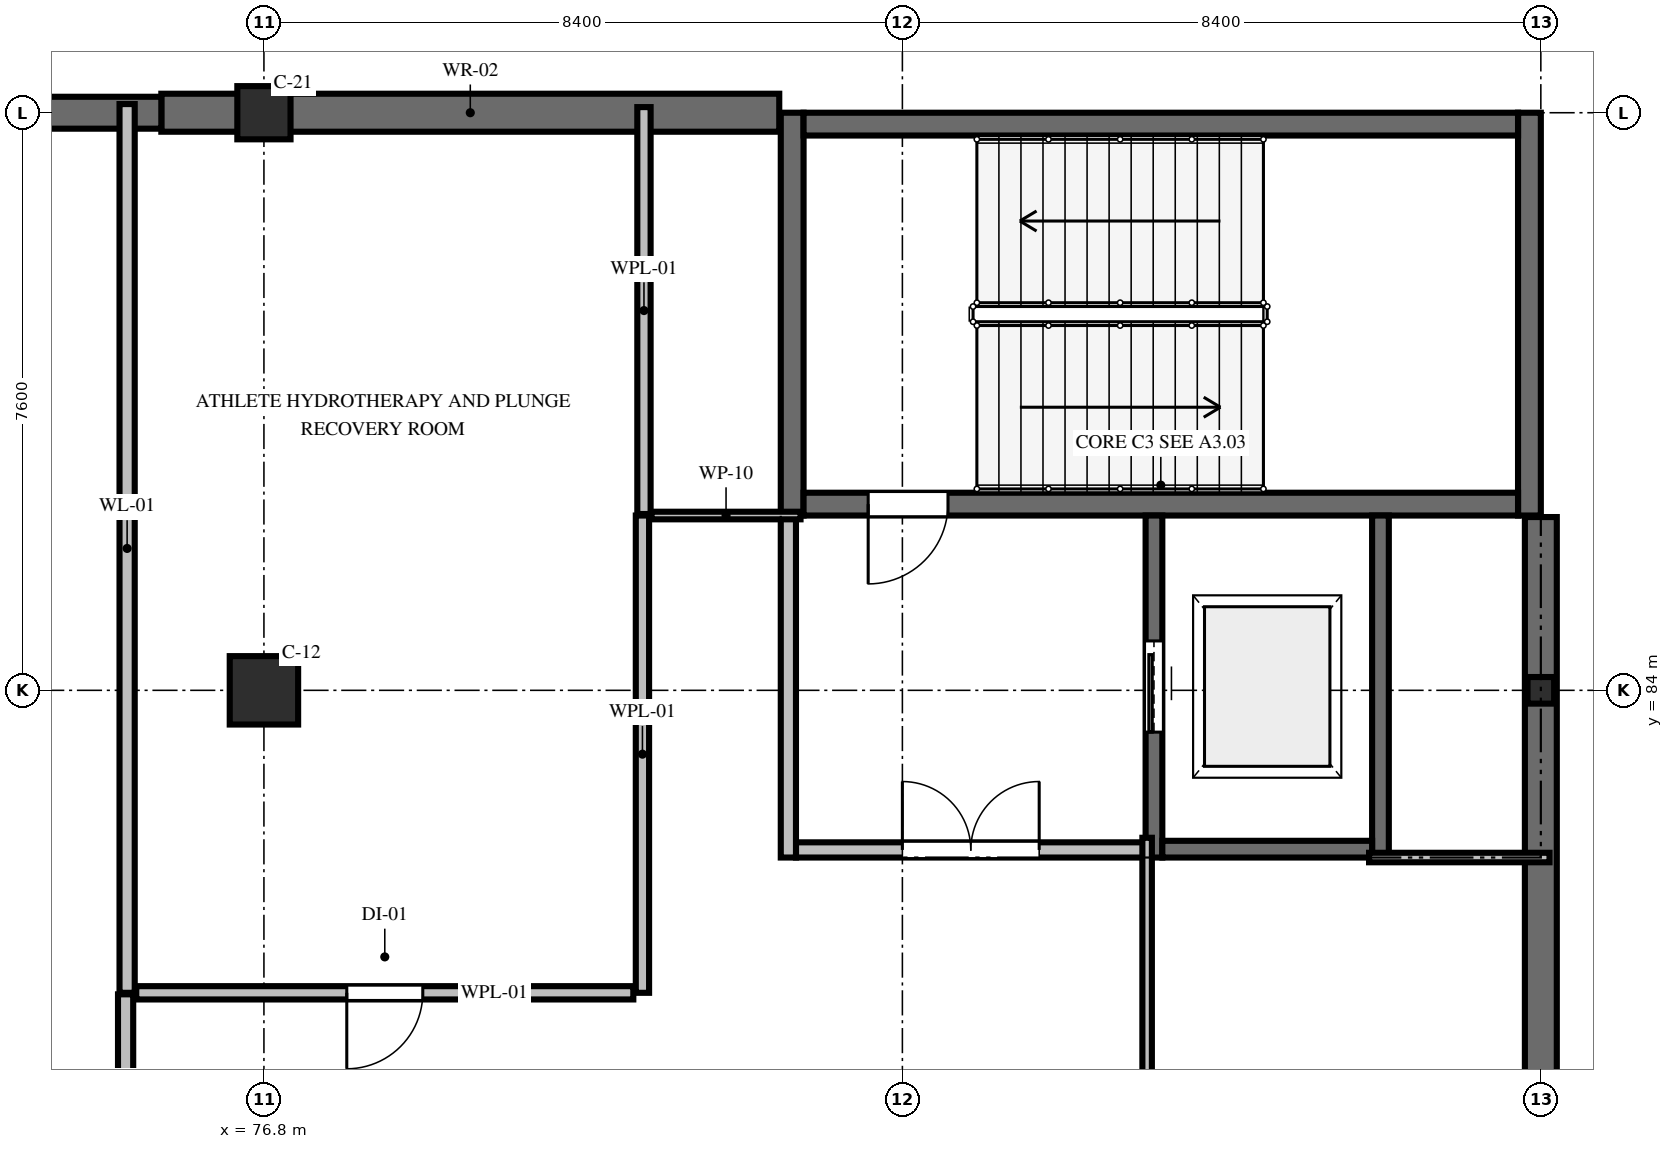
"""IFC4 building model, lengths in metres.
Left out: names, types, materials, properties, quantities, classifications, styles, units other than length and angle.
Written with IfcOpenShell. Run it as: python <this file> out.ifc"""

import sys

from ifc_helpers import new_model, si_unit, direction, frame, frame_2d, origin, origin_2d, place, context, subcontext, project, spatial, rectangle, hollow_rectangle, circle, i_section, extrude, element, fill, save


model = new_model("IFC4")
c1 = context("Model", 3, precision=1e-05, world=origin(), true_north=direction((0.0, 1.0)))
c2 = subcontext(c1, "Body", "Model", "MODEL_VIEW")
j1 = project(units=[si_unit("LENGTHUNIT", "METRE"), si_unit("PLANEANGLEUNIT", "RADIAN")], contexts=[c1])
p1 = place(None, origin())
s1 = spatial("IfcSite", under=j1, at=p1, CompositionType="ELEMENT")
p2 = place(p1, origin())
s2 = spatial("IfcBuilding", under=s1, at=p2, CompositionType="ELEMENT")
p3 = place(p2, frame((0.0, 0.0, -4.8)))
s3 = spatial("IfcBuildingStorey", under=s2, at=p3, CompositionType="ELEMENT", Elevation=-4.8)
p4 = place(p3, frame((76.8, 84.0, 0.0), z_axis=(0.0, 0.0, 1.0), x_axis=(1.0, 0.0, 0.0)))
e1 = element("IfcColumn", 1, at=p4, inside=s3, PredefinedType="COLUMN", context=c2, shape_type="SweptSolid", body=[
    extrude(circle(Radius=0.45, at=origin_2d()), origin(), (0.0, 0.0, 1.0), 4.8),
])
p5 = place(p3, frame((76.8, 91.6, 0.0), z_axis=(0.0, 0.0, 1.0), x_axis=(1.0, 0.0, 0.0)))
e2 = element("IfcColumn", 2, at=p5, inside=s3, PredefinedType="COLUMN", context=c2, shape_type="SweptSolid", body=[
    extrude(hollow_rectangle(XDim=0.7, YDim=0.7, WallThickness=0.028, InnerFilletRadius=0.028, OuterFilletRadius=0.056, at=origin_2d()), origin(), (0.0, 0.0, 1.0), 4.8),
])
p6 = place(p3, frame((93.6, 84.0, 0.0), z_axis=(0.0, 0.0, 1.0), x_axis=(1.0, 0.0, 0.0)))
e3 = element("IfcColumn", 3, at=p6, inside=s3, PredefinedType="COLUMN", context=c2, shape_type="SweptSolid", body=[
    extrude(i_section(OverallWidth=0.35, OverallDepth=0.35, WebThickness=0.012, FlangeThickness=0.019, FilletRadius=0.013, at=origin_2d()), origin(), (0.0, 0.0, 1.0), 4.8),
])
p7 = place(p3, frame((93.6, 77.971, 0.0), z_axis=(0.0, 0.0, 1.0), x_axis=(0.0, 1.0, 0.0)))
e4 = element("IfcWall", 4, at=p7, inside=s3, PredefinedType="USERDEFINED", context=c2, shape_type="SweptSolid", body=[
    extrude(rectangle(XDim=8.309, YDim=0.42, at=frame_2d((4.154, 0.0))), origin(), (0.0, 0.0, 1.0), 4.32),
])
p8 = place(p3, frame((83.58, 91.6, 0.0), z_axis=(0.0, 0.0, 1.0), x_axis=(-1.0, 0.0, 0.0)))
e5 = element("IfcWall", 5, at=p8, inside=s3, PredefinedType="USERDEFINED", context=c2, shape_type="SweptSolid", body=[
    extrude(rectangle(XDim=8.13, YDim=0.5, at=frame_2d((4.065, 0.0))), origin(), (0.0, 0.0, 1.0), 4.32),
])
p9 = place(p3, frame((75.45, 91.6, 0.0), z_axis=(0.0, 0.0, 1.0), x_axis=(-1.0, 0.0, 0.0)))
e6 = element("IfcWall", 6, at=p9, inside=s3, PredefinedType="USERDEFINED", context=c2, shape_type="SweptSolid", body=[
    extrude(rectangle(XDim=8.13, YDim=0.42, at=frame_2d((4.065, 0.0))), origin(), (0.0, 0.0, 1.0), 4.32),
])
for number, where, z_axis, x_axis in (
    (7, (83.75, 86.3, 0.0), (0.0, 0.0, 1.0), (0.0, 1.0, 0.0)),
    (8, (93.45, 91.6, 0.0), (0.0, 0.0, 1.0), (0.0, -1.0, 0.0)),
):
    element("IfcWall", number, at=place(p3, frame(where, z_axis=z_axis, x_axis=x_axis)), inside=s3, PredefinedType="SHEAR", context=c2, shape_type="SweptSolid", body=[
        extrude(rectangle(XDim=5.3, YDim=0.3, at=frame_2d((2.65, 0.0))), origin(), (0.0, 0.0, 1.0), 4.51),
    ])
p10 = place(p3, frame((93.3, 86.45, 0.0), z_axis=(0.0, 0.0, 1.0), x_axis=(-1.0, 0.0, 0.0)))
e9 = element("IfcWall", 9, at=p10, inside=s3, PredefinedType="SHEAR", context=c2, shape_type="SweptSolid", body=[
    extrude(rectangle(XDim=9.4, YDim=0.3, at=frame_2d((4.7, 0.0))), origin(), (0.0, 0.0, 1.0), 4.51),
])
p11 = place(p10, frame((7.5, 0.0, 0.0)))
e10 = element("IfcOpeningElement", 10, at=p11, cuts=e9, PredefinedType="OPENING", context=c2, shape_type="SweptSolid", body=[
    extrude(rectangle(XDim=1.05, YDim=2.2, at=frame_2d((0.525, 1.1))), frame((0.0, 0.16, 0.0), z_axis=(0.0, -1.0, 0.0), x_axis=(1.0, 0.0, 0.0)), (0.0, 0.0, 1.0), 0.32),
])
p12 = place(p3, frame((83.9, 91.45, 0.0), z_axis=(0.0, 0.0, 1.0), x_axis=(1.0, 0.0, 0.0)))
e11 = element("IfcWall", 11, at=p12, inside=s3, PredefinedType="SHEAR", context=c2, shape_type="SweptSolid", body=[
    extrude(rectangle(XDim=9.4, YDim=0.3, at=frame_2d((4.7, 0.0))), origin(), (0.0, 0.0, 1.0), 4.51),
])
p13 = place(p3, frame((83.8, 81.9, 0.0), z_axis=(0.0, 0.0, 1.0), x_axis=(1.0, 0.0, 0.0)))
e12 = element("IfcWall", 12, at=p13, inside=s3, PredefinedType="SOLIDWALL", context=c2, shape_type="SweptSolid", body=[
    extrude(rectangle(XDim=4.6, YDim=0.2, at=frame_2d((2.3, 0.0))), origin(), (0.0, 0.0, 1.0), 3.578),
])
p14 = place(p13, frame((1.4, 0.0, 0.0)))
e13 = element("IfcOpeningElement", 13, at=p14, cuts=e12, PredefinedType="OPENING", context=c2, shape_type="SweptSolid", body=[
    extrude(rectangle(XDim=1.8, YDim=2.2, at=frame_2d((0.9, 1.1))), frame((0.0, 0.11, 0.0), z_axis=(0.0, -1.0, 0.0), x_axis=(1.0, 0.0, 0.0)), (0.0, 0.0, 1.0), 0.22),
])
p15 = place(p3, frame((83.7, 81.8, 0.0), z_axis=(0.0, 0.0, 1.0), x_axis=(0.0, 1.0, 0.0)))
e14 = element("IfcWall", 14, at=p15, inside=s3, PredefinedType="SOLIDWALL", context=c2, shape_type="SweptSolid", body=[
    extrude(rectangle(XDim=4.5, YDim=0.2, at=frame_2d((2.25, 0.0))), origin(), (0.0, 0.0, 1.0), 3.578),
])
p16 = place(p3, frame((88.51, 81.8, 0.0), z_axis=(0.0, 0.0, 1.0), x_axis=(0.0, 1.0, 0.0)))
e15 = element("IfcWall", 15, at=p16, inside=s3, PredefinedType="SOLIDWALL", context=c2, shape_type="SweptSolid", body=[
    extrude(rectangle(XDim=4.5, YDim=0.22, at=frame_2d((2.25, 0.0))), origin(), (0.0, 0.0, 1.0), 4.51),
])
p17 = place(p16, frame((1.65, 0.0, 0.0)))
e16 = element("IfcOpeningElement", 16, at=p17, cuts=e15, PredefinedType="OPENING", context=c2, shape_type="SweptSolid", body=[
    extrude(rectangle(XDim=1.2, YDim=2.2, at=frame_2d((0.6, 1.1))), frame((0.0, 0.12, 0.0), z_axis=(0.0, -1.0, 0.0), x_axis=(1.0, 0.0, 0.0)), (0.0, 0.0, 1.0), 0.24),
])
p18 = place(p3, frame((91.49, 81.8, 0.0), z_axis=(0.0, 0.0, 1.0), x_axis=(0.0, 1.0, 0.0)))
e17 = element("IfcWall", 17, at=p18, inside=s3, PredefinedType="SOLIDWALL", context=c2, shape_type="SweptSolid", body=[
    extrude(rectangle(XDim=4.5, YDim=0.22, at=frame_2d((2.25, 0.0))), origin(), (0.0, 0.0, 1.0), 4.51),
])
p19 = place(p3, frame((88.62, 81.91, 0.0), z_axis=(0.0, 0.0, 1.0), x_axis=(1.0, 0.0, 0.0)))
e18 = element("IfcWall", 18, at=p19, inside=s3, PredefinedType="SOLIDWALL", context=c2, shape_type="SweptSolid", body=[
    extrude(rectangle(XDim=2.76, YDim=0.22, at=frame_2d((1.38, 0.0))), origin(), (0.0, 0.0, 1.0), 4.51),
])
p20 = place(p3, frame((75.0, 91.714, 0.0), z_axis=(0.0, 0.0, 1.0), x_axis=(0.0, -1.0, 0.0)))
e19 = element("IfcWall", 19, at=p20, inside=s3, PredefinedType="SOLIDWALL", context=c2, shape_type="SweptSolid", body=[
    extrude(rectangle(XDim=11.694, YDim=0.2, at=frame_2d((5.847, 0.0))), origin(), (0.0, 0.0, 1.0), 3.32),
])
p21 = place(p3, frame((74.98, 80.0, 0.0), z_axis=(0.0, 0.0, 1.0), x_axis=(0.0, -1.0, 0.0)))
e20 = element("IfcWall", 20, at=p21, inside=s3, PredefinedType="SOLIDWALL", context=c2, shape_type="SweptSolid", body=[
    extrude(rectangle(XDim=3.38, YDim=0.2, at=frame_2d((1.69, 0.0))), origin(), (0.0, 0.0, 1.0), 4.07),
])
p22 = place(p3, frame((81.8, 91.674, 0.0), z_axis=(0.0, 0.0, 1.0), x_axis=(0.0, -1.0, 0.0)))
e21 = element("IfcWall", 21, at=p22, inside=s3, PredefinedType="PLUMBINGWALL", context=c2, shape_type="SweptSolid", body=[
    extrude(rectangle(XDim=5.354, YDim=0.175, at=frame_2d((2.677, 0.0))), origin(), (0.0, 0.0, 1.0), 4.45),
])
p23 = place(p3, frame((81.78, 86.3, 0.0), z_axis=(0.0, 0.0, 1.0), x_axis=(0.0, -1.0, 0.0)))
e22 = element("IfcWall", 22, at=p23, inside=s3, PredefinedType="PLUMBINGWALL", context=c2, shape_type="SweptSolid", body=[
    extrude(rectangle(XDim=6.28, YDim=0.175, at=frame_2d((3.14, 0.0))), origin(), (0.0, 0.0, 1.0), 4.45),
])
p24 = place(p3, frame((81.66, 80.02, 0.0), z_axis=(0.0, 0.0, 1.0), x_axis=(-1.0, 0.0, 0.0)))
e23 = element("IfcWall", 23, at=p24, inside=s3, PredefinedType="PLUMBINGWALL", context=c2, shape_type="SweptSolid", body=[
    extrude(rectangle(XDim=6.54, YDim=0.175, at=frame_2d((3.27, 0.0))), origin(), (0.0, 0.0, 1.0), 3.62),
])
p25 = place(p24, frame((2.77, 0.0, 0.0)))
e24 = element("IfcOpeningElement", 24, at=p25, cuts=e23, PredefinedType="OPENING", context=c2, shape_type="SweptSolid", body=[
    extrude(rectangle(XDim=1.0, YDim=2.15, at=frame_2d((0.5, 1.075))), frame((0.0, 0.097, 0.0), z_axis=(0.0, -1.0, 0.0), x_axis=(1.0, 0.0, 0.0)), (0.0, 0.0, 1.0), 0.195),
])
p26 = place(p3, frame((88.42, 56.42, 0.0), z_axis=(0.0, 0.0, 1.0), x_axis=(0.0, 1.0, 0.0)))
e25 = element("IfcWall", 25, at=p26, inside=s3, PredefinedType="PARTITIONING", context=c2, shape_type="SweptSolid", body=[
    extrude(rectangle(XDim=25.64, YDim=0.125, at=frame_2d((12.82, 0.0))), origin(), (0.0, 0.0, 1.0), 3.32),
])
p27 = place(p26, frame((11.62, 0.0, 0.0)))
e26 = element("IfcOpeningElement", 26, at=p27, cuts=e25, PredefinedType="OPENING", context=c2, shape_type="SweptSolid", body=[
    extrude(rectangle(XDim=2.4, YDim=2.3, at=frame_2d((1.2, 1.15))), frame((0.0, 0.073, 0.0), z_axis=(0.0, -1.0, 0.0), x_axis=(1.0, 0.0, 0.0)), (0.0, 0.0, 1.0), 0.145),
])
p28 = place(p3, frame((91.34, 81.8, 0.0), z_axis=(0.0, 0.0, 1.0), x_axis=(1.0, 0.0, 0.0)))
e27 = element("IfcWall", 27, at=p28, inside=s3, PredefinedType="PARTITIONING", context=c2, shape_type="SweptSolid", body=[
    extrude(rectangle(XDim=2.374, YDim=0.125, at=frame_2d((1.187, 0.0))), origin(), (0.0, 0.0, 1.0), 3.92),
])
p29 = place(p3, frame((81.9, 86.3, 0.0), z_axis=(0.0, 0.0, 1.0), x_axis=(1.0, 0.0, 0.0)))
e28 = element("IfcWall", 28, at=p29, inside=s3, PredefinedType="PARTITIONING", context=c2, shape_type="SweptSolid", body=[
    extrude(rectangle(XDim=1.96, YDim=0.1, at=frame_2d((0.98, 0.0))), origin(), (0.0, 0.0, 1.0), 4.45),
])
p30 = place(p11, origin())
e29 = element("IfcDoor", 29, at=p30, inside=s3, OperationType="SINGLE_SWING_RIGHT", PredefinedType="DOOR", context=c2, shape_type="SweptSolid", body=[
    extrude(rectangle(XDim=1.05, YDim=2.2, at=frame_2d((0.525, 1.1))), frame((0.0, 0.025, 0.0), z_axis=(0.0, -1.0, 0.0), x_axis=(1.0, 0.0, 0.0)), (0.0, 0.0, 1.0), 0.05),
])
fill(e10, e29)
p31 = place(p14, origin())
e30 = element("IfcDoor", 30, at=p31, inside=s3, OperationType="DOUBLE_DOOR_SINGLE_SWING", PredefinedType="DOOR", context=c2, shape_type="SweptSolid", body=[
    extrude(rectangle(XDim=1.8, YDim=2.2, at=frame_2d((0.9, 1.1))), frame((0.0, 0.025, 0.0), z_axis=(0.0, -1.0, 0.0), x_axis=(1.0, 0.0, 0.0)), (0.0, 0.0, 1.0), 0.05),
])
fill(e13, e30)
p32 = place(p17, origin())
e31 = element("IfcDoor", 31, at=p32, inside=s3, OperationType="SLIDING_TO_LEFT", PredefinedType="DOOR", context=c2, shape_type="SweptSolid", body=[
    extrude(rectangle(XDim=1.2, YDim=2.2, at=frame_2d((0.6, 1.1))), frame((0.0, 0.025, 0.0), z_axis=(0.0, -1.0, 0.0), x_axis=(1.0, 0.0, 0.0)), (0.0, 0.0, 1.0), 0.05),
])
fill(e16, e31)
p33 = place(p25, origin())
e32 = element("IfcDoor", 32, at=p33, inside=s3, OperationType="SINGLE_SWING_RIGHT", PredefinedType="DOOR", context=c2, shape_type="SweptSolid", body=[
    extrude(rectangle(XDim=1.0, YDim=2.15, at=frame_2d((0.5, 1.075))), frame((0.0, 0.025, 0.0), z_axis=(0.0, -1.0, 0.0), x_axis=(1.0, 0.0, 0.0)), (0.0, 0.0, 1.0), 0.05),
])
fill(e24, e32)
save(model, sys.argv[1])
